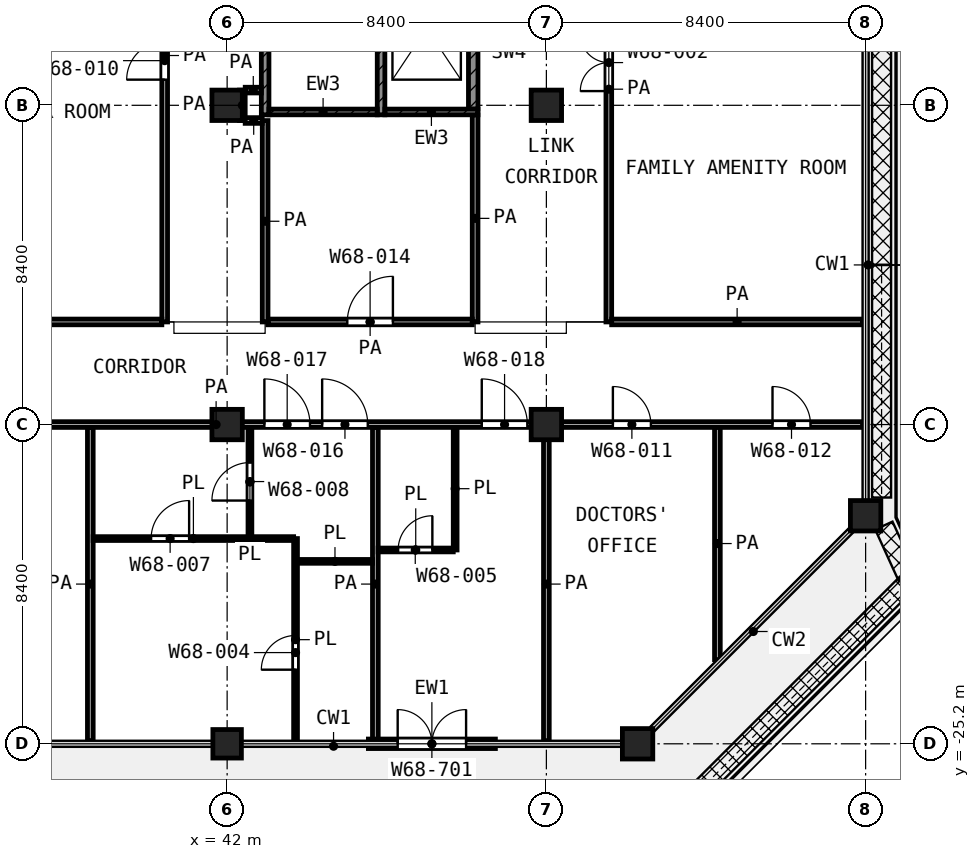
"""IFC4 building model, lengths in metres.
Left out: names, types, materials, properties, quantities, classifications, styles, units other than length and angle.
Written with IfcOpenShell. Run it as: python <this file> out.ifc"""

import sys

from ifc_helpers import new_model, si_unit, direction, frame, frame_2d, origin, origin_2d, place, context, subcontext, project, spatial, rectangle, extrude, element, fill, save


model = new_model("IFC4")
c1 = context("Model", 3, precision=1e-05, world=origin(), true_north=direction((0.0, 1.0)))
c2 = subcontext(c1, "Body", "Model", "MODEL_VIEW")
j1 = project(units=[si_unit("LENGTHUNIT", "METRE"), si_unit("PLANEANGLEUNIT", "RADIAN")], contexts=[c1])
p1 = place(None, origin())
s1 = spatial("IfcSite", under=j1, at=p1, CompositionType="ELEMENT")
p2 = place(p1, origin())
s2 = spatial("IfcBuilding", under=s1, at=p2, CompositionType="ELEMENT")
p3 = place(p2, frame((0.0, 0.0, 294.4)))
s3 = spatial("IfcBuildingStorey", under=s2, at=p3, CompositionType="ELEMENT", Elevation=294.4)
for number, where, z_axis, x_axis in (
    (1, (42.0, -8.4, 0.0), (0.0, 0.0, 1.0), (1.0, 0.0, 0.0)),
    (2, (50.4, -8.4, 0.0), (0.0, 0.0, 1.0), (1.0, 0.0, 0.0)),
    (3, (42.0, -16.8, 0.0), (0.0, 0.0, 1.0), (1.0, 0.0, 0.0)),
    (4, (50.4, -16.8, 0.0), (0.0, 0.0, 1.0), (1.0, 0.0, 0.0)),
    (5, (58.8, -19.2, 0.0), (0.0, 0.0, 1.0), (1.0, 0.0, 0.0)),
):
    element("IfcColumn", number, at=place(p3, frame(where, z_axis=z_axis, x_axis=x_axis)), inside=s3, PredefinedType="COLUMN", context=c2, shape_type="SweptSolid", body=[
        extrude(rectangle(XDim=0.8, YDim=0.8, at=origin_2d()), origin(), (0.0, 0.0, 1.0), 4.2),
    ])
p4 = place(p3, frame((42.0, -25.2, 0.0), z_axis=(0.0, 0.0, 1.0), x_axis=(1.0, 0.0, 0.0)))
e6 = element("IfcColumn", 6, at=p4, inside=s3, PredefinedType="COLUMN", context=c2, shape_type="SweptSolid", body=[
    extrude(rectangle(XDim=0.75, YDim=0.75, at=origin_2d()), origin(), (0.0, 0.0, 1.0), 4.2),
])
p5 = place(p3, frame((52.8, -25.2, 0.0), z_axis=(0.0, 0.0, 1.0), x_axis=(1.0, 0.0, 0.0)))
e7 = element("IfcColumn", 7, at=p5, inside=s3, PredefinedType="COLUMN", context=c2, shape_type="SweptSolid", body=[
    extrude(rectangle(XDim=0.8, YDim=0.8, at=origin_2d()), origin(), (0.0, 0.0, 1.0), 4.2),
])
p6 = place(p3, frame((45.717, -25.2, 0.0), z_axis=(0.0, 0.0, 1.0), x_axis=(1.0, 0.0, 0.0)))
e8 = element("IfcWall", 8, at=p6, inside=s3, PredefinedType="SOLIDWALL", context=c2, shape_type="SweptSolid", body=[
    extrude(rectangle(XDim=3.342, YDim=0.25, at=frame_2d((1.671, 0.0))), origin(), (0.0, 0.0, 1.0), 3.48),
])
p7 = place(p6, frame((0.771, 0.0, 0.0)))
e9 = element("IfcOpeningElement", 9, at=p7, cuts=e8, PredefinedType="OPENING", context=c2, shape_type="SweptSolid", body=[
    extrude(rectangle(XDim=1.8, YDim=2.1, at=frame_2d((0.9, 1.05))), frame((0.0, 0.135, 0.0), z_axis=(0.0, -1.0, 0.0), x_axis=(1.0, 0.0, 0.0)), (0.0, 0.0, 1.0), 0.27),
])
p8 = place(p3, frame((43.0, -8.65, 0.0), z_axis=(0.0, 0.0, 1.0), x_axis=(0.0, 1.0, 0.0)))
e10 = element("IfcWall", 10, at=p8, inside=s3, PredefinedType="SHEAR", context=c2, shape_type="SweptSolid", body=[
    extrude(rectangle(XDim=8.35, YDim=0.2, at=frame_2d((4.175, 0.0))), origin(), (0.0, 0.0, 1.0), 3.6),
])
p9 = place(p8, frame((7.0, 0.0, 0.0)))
e11 = element("IfcOpeningElement", 11, at=p9, cuts=e10, PredefinedType="OPENING", context=c2, shape_type="SweptSolid", body=[
    extrude(rectangle(XDim=1.1, YDim=2.1, at=frame_2d((0.55, 1.05))), frame((0.0, 0.11, 0.0), z_axis=(0.0, -1.0, 0.0), x_axis=(1.0, 0.0, 0.0)), (0.0, 0.0, 1.0), 0.22),
])
p10 = place(p3, frame((46.05, -8.65, 0.0), z_axis=(0.0, 0.0, 1.0), x_axis=(0.0, 1.0, 0.0)))
e12 = element("IfcWall", 12, at=p10, inside=s3, PredefinedType="SHEAR", context=c2, shape_type="SweptSolid", body=[
    extrude(rectangle(XDim=8.35, YDim=0.2, at=frame_2d((4.175, 0.0))), origin(), (0.0, 0.0, 1.0), 3.6),
])
p11 = place(p10, frame((7.0, 0.0, 0.0)))
e13 = element("IfcOpeningElement", 13, at=p11, cuts=e12, PredefinedType="OPENING", context=c2, shape_type="SweptSolid", body=[
    extrude(rectangle(XDim=1.1, YDim=2.1, at=frame_2d((0.55, 1.05))), frame((0.0, 0.11, 0.0), z_axis=(0.0, -1.0, 0.0), x_axis=(1.0, 0.0, 0.0)), (0.0, 0.0, 1.0), 0.22),
])
p12 = place(p3, frame((43.1, -8.575, 0.0), z_axis=(0.0, 0.0, 1.0), x_axis=(1.0, 0.0, 0.0)))
e14 = element("IfcWall", 14, at=p12, inside=s3, PredefinedType="SHEAR", context=c2, shape_type="SweptSolid", body=[
    extrude(rectangle(XDim=2.85, YDim=0.15, at=frame_2d((1.425, 0.0))), origin(), (0.0, 0.0, 1.0), 3.6),
])
p13 = place(p3, frame((46.15, -8.575, 0.0), z_axis=(0.0, 0.0, 1.0), x_axis=(1.0, 0.0, 0.0)))
e15 = element("IfcWall", 15, at=p13, inside=s3, PredefinedType="SHEAR", context=c2, shape_type="SweptSolid", body=[
    extrude(rectangle(XDim=2.45, YDim=0.15, at=frame_2d((1.225, 0.0))), origin(), (0.0, 0.0, 1.0), 3.6),
])
p14 = place(p3, frame((48.475, -8.5, 0.0), z_axis=(0.0, 0.0, 1.0), x_axis=(0.0, 1.0, 0.0)))
e16 = element("IfcWall", 16, at=p14, inside=s3, PredefinedType="SHEAR", context=c2, shape_type="SweptSolid", body=[
    extrude(rectangle(XDim=3.475, YDim=0.25, at=frame_2d((1.738, 0.0))), origin(), (0.0, 0.0, 1.0), 3.6),
])
p15 = place(p3, frame((43.85, -20.4, 0.0), z_axis=(0.0, 0.0, 1.0), x_axis=(1.0, 0.0, 0.0)))
e17 = element("IfcWall", 17, at=p15, inside=s3, PredefinedType="PARTITIONING", context=c2, shape_type="SweptSolid", body=[
    extrude(rectangle(XDim=1.975, YDim=0.1, at=frame_2d((0.987, 0.0))), origin(), (0.0, 0.0, 1.0), 3.6),
])
p16 = place(p3, frame((45.975, -20.1, 0.0), z_axis=(0.0, 0.0, 1.0), x_axis=(1.0, 0.0, 0.0)))
e18 = element("IfcWall", 18, at=p16, inside=s3, PredefinedType="PARTITIONING", context=c2, shape_type="SweptSolid", body=[
    extrude(rectangle(XDim=1.975, YDim=0.1, at=frame_2d((0.987, 0.0))), origin(), (0.0, 0.0, 1.0), 3.6),
])
p17 = place(p16, frame((0.525, 0.0, 0.0)))
e19 = element("IfcOpeningElement", 19, at=p17, cuts=e18, PredefinedType="OPENING", context=c2, shape_type="SweptSolid", body=[
    extrude(rectangle(XDim=0.9, YDim=2.1, at=frame_2d((0.45, 1.05))), frame((0.0, 0.06, 0.0), z_axis=(0.0, -1.0, 0.0), x_axis=(1.0, 0.0, 0.0)), (0.0, 0.0, 1.0), 0.12),
])
p18 = place(p3, frame((38.475, -19.8, 0.0), z_axis=(0.0, 0.0, 1.0), x_axis=(1.0, 0.0, 0.0)))
e20 = element("IfcWall", 20, at=p18, inside=s3, PredefinedType="PARTITIONING", context=c2, shape_type="SweptSolid", body=[
    extrude(rectangle(XDim=5.275, YDim=0.1, at=frame_2d((2.637, 0.0))), origin(), (0.0, 0.0, 1.0), 3.6),
])
p19 = place(p18, frame((1.525, 0.0, 0.0)))
e21 = element("IfcOpeningElement", 21, at=p19, cuts=e20, PredefinedType="OPENING", context=c2, shape_type="SweptSolid", body=[
    extrude(rectangle(XDim=1.0, YDim=2.1, at=frame_2d((0.5, 1.05))), frame((0.0, 0.06, 0.0), z_axis=(0.0, -1.0, 0.0), x_axis=(1.0, 0.0, 0.0)), (0.0, 0.0, 1.0), 0.12),
])
p20 = place(p3, frame((42.6, -19.75, 0.0), z_axis=(0.0, 0.0, 1.0), x_axis=(0.0, 1.0, 0.0)))
e22 = element("IfcWall", 22, at=p20, inside=s3, PredefinedType="PARTITIONING", context=c2, shape_type="SweptSolid", body=[
    extrude(rectangle(XDim=2.875, YDim=0.1, at=frame_2d((1.438, 0.0))), origin(), (0.0, 0.0, 1.0), 3.6),
])
p21 = place(p20, frame((0.95, 0.0, 0.0)))
e23 = element("IfcOpeningElement", 23, at=p21, cuts=e22, PredefinedType="OPENING", context=c2, shape_type="SweptSolid", body=[
    extrude(rectangle(XDim=1.0, YDim=2.1, at=frame_2d((0.5, 1.05))), frame((0.0, 0.06, 0.0), z_axis=(0.0, -1.0, 0.0), x_axis=(1.0, 0.0, 0.0)), (0.0, 0.0, 1.0), 0.12),
])
p22 = place(p3, frame((43.8, -25.12, 0.0), z_axis=(0.0, 0.0, 1.0), x_axis=(0.0, 1.0, 0.0)))
e24 = element("IfcWall", 24, at=p22, inside=s3, PredefinedType="PARTITIONING", context=c2, shape_type="SweptSolid", body=[
    extrude(rectangle(XDim=5.32, YDim=0.1, at=frame_2d((2.66, 0.0))), origin(), (0.0, 0.0, 1.0), 3.6),
])
p23 = place(p22, frame((1.87, 0.0, 0.0)))
e25 = element("IfcOpeningElement", 25, at=p23, cuts=e24, PredefinedType="OPENING", context=c2, shape_type="SweptSolid", body=[
    extrude(rectangle(XDim=0.9, YDim=2.1, at=frame_2d((0.45, 1.05))), frame((0.0, 0.06, 0.0), z_axis=(0.0, -1.0, 0.0), x_axis=(1.0, 0.0, 0.0)), (0.0, 0.0, 1.0), 0.12),
])
p24 = place(p3, frame((48.0, -20.1, 0.0), z_axis=(0.0, 0.0, 1.0), x_axis=(0.0, 1.0, 0.0)))
e26 = element("IfcWall", 26, at=p24, inside=s3, PredefinedType="PARTITIONING", context=c2, shape_type="SweptSolid", body=[
    extrude(rectangle(XDim=3.225, YDim=0.1, at=frame_2d((1.613, 0.0))), origin(), (0.0, 0.0, 1.0), 3.6),
])
p25 = place(p3, frame((24.7, -16.8, 0.0), z_axis=(0.0, 0.0, 1.0), x_axis=(1.0, 0.0, 0.0)))
e27 = element("IfcWall", 27, at=p25, inside=s3, PredefinedType="PARTITIONING", context=c2, shape_type="SweptSolid", body=[
    extrude(rectangle(XDim=34.02, YDim=0.15, at=frame_2d((17.01, 0.0))), origin(), (0.0, 0.0, 1.0), 3.6),
])
p26 = place(p25, frame((1.85, 0.0, 0.0)))
e28 = element("IfcOpeningElement", 28, at=p26, cuts=e27, PredefinedType="OPENING", context=c2, shape_type="SweptSolid", body=[
    extrude(rectangle(XDim=1.5, YDim=2.1, at=frame_2d((0.75, 1.05))), frame((0.0, 0.085, 0.0), z_axis=(0.0, -1.0, 0.0), x_axis=(1.0, 0.0, 0.0)), (0.0, 0.0, 1.0), 0.17),
])
p27 = place(p25, frame((9.4, 0.0, 0.0)))
e29 = element("IfcOpeningElement", 29, at=p27, cuts=e27, PredefinedType="OPENING", context=c2, shape_type="SweptSolid", body=[
    extrude(rectangle(XDim=1.2, YDim=2.1, at=frame_2d((0.6, 1.05))), frame((0.0, 0.085, 0.0), z_axis=(0.0, -1.0, 0.0), x_axis=(1.0, 0.0, 0.0)), (0.0, 0.0, 1.0), 0.17),
])
p28 = place(p25, frame((19.8, 0.0, 0.0)))
e30 = element("IfcOpeningElement", 30, at=p28, cuts=e27, PredefinedType="OPENING", context=c2, shape_type="SweptSolid", body=[
    extrude(rectangle(XDim=1.2, YDim=2.1, at=frame_2d((0.6, 1.05))), frame((0.0, 0.085, 0.0), z_axis=(0.0, -1.0, 0.0), x_axis=(1.0, 0.0, 0.0)), (0.0, 0.0, 1.0), 0.17),
])
p29 = place(p25, frame((18.28, 0.0, 0.0)))
e31 = element("IfcOpeningElement", 31, at=p29, cuts=e27, PredefinedType="OPENING", context=c2, shape_type="SweptSolid", body=[
    extrude(rectangle(XDim=1.2, YDim=2.1, at=frame_2d((0.6, 1.05))), frame((0.0, 0.085, 0.0), z_axis=(0.0, -1.0, 0.0), x_axis=(1.0, 0.0, 0.0)), (0.0, 0.0, 1.0), 0.17),
])
p30 = place(p25, frame((24.0, 0.0, 0.0)))
e32 = element("IfcOpeningElement", 32, at=p30, cuts=e27, PredefinedType="OPENING", context=c2, shape_type="SweptSolid", body=[
    extrude(rectangle(XDim=1.2, YDim=2.1, at=frame_2d((0.6, 1.05))), frame((0.0, 0.085, 0.0), z_axis=(0.0, -1.0, 0.0), x_axis=(1.0, 0.0, 0.0)), (0.0, 0.0, 1.0), 0.17),
])
p31 = place(p25, frame((27.45, 0.0, 0.0)))
e33 = element("IfcOpeningElement", 33, at=p31, cuts=e27, PredefinedType="OPENING", context=c2, shape_type="SweptSolid", body=[
    extrude(rectangle(XDim=1.0, YDim=2.1, at=frame_2d((0.5, 1.05))), frame((0.0, 0.085, 0.0), z_axis=(0.0, -1.0, 0.0), x_axis=(1.0, 0.0, 0.0)), (0.0, 0.0, 1.0), 0.17),
])
p32 = place(p25, frame((31.65, 0.0, 0.0)))
e34 = element("IfcOpeningElement", 34, at=p32, cuts=e27, PredefinedType="OPENING", context=c2, shape_type="SweptSolid", body=[
    extrude(rectangle(XDim=1.0, YDim=2.1, at=frame_2d((0.5, 1.05))), frame((0.0, 0.085, 0.0), z_axis=(0.0, -1.0, 0.0), x_axis=(1.0, 0.0, 0.0)), (0.0, 0.0, 1.0), 0.17),
])
p33 = place(p3, frame((29.475, -14.1, 0.0), z_axis=(0.0, 0.0, 1.0), x_axis=(1.0, 0.0, 0.0)))
e35 = element("IfcWall", 35, at=p33, inside=s3, PredefinedType="PARTITIONING", context=c2, shape_type="SweptSolid", body=[
    extrude(rectangle(XDim=10.807, YDim=0.15, at=frame_2d((5.403, 0.0))), origin(), (0.0, 0.0, 1.0), 3.6),
])
p34 = place(p33, frame((1.425, 0.0, 0.0)))
e36 = element("IfcOpeningElement", 36, at=p34, cuts=e35, PredefinedType="OPENING", context=c2, shape_type="SweptSolid", body=[
    extrude(rectangle(XDim=1.2, YDim=2.1, at=frame_2d((0.6, 1.05))), frame((0.0, 0.085, 0.0), z_axis=(0.0, -1.0, 0.0), x_axis=(1.0, 0.0, 0.0)), (0.0, 0.0, 1.0), 0.17),
])
p35 = place(p3, frame((43.075, -14.1, 0.0), z_axis=(0.0, 0.0, 1.0), x_axis=(1.0, 0.0, 0.0)))
e37 = element("IfcWall", 37, at=p35, inside=s3, PredefinedType="PARTITIONING", context=c2, shape_type="SweptSolid", body=[
    extrude(rectangle(XDim=5.375, YDim=0.15, at=frame_2d((2.688, 0.0))), origin(), (0.0, 0.0, 1.0), 3.6),
])
p36 = place(p35, frame((2.087, 0.0, 0.0)))
e38 = element("IfcOpeningElement", 38, at=p36, cuts=e37, PredefinedType="OPENING", context=c2, shape_type="SweptSolid", body=[
    extrude(rectangle(XDim=1.2, YDim=2.1, at=frame_2d((0.6, 1.05))), frame((0.0, 0.085, 0.0), z_axis=(0.0, -1.0, 0.0), x_axis=(1.0, 0.0, 0.0)), (0.0, 0.0, 1.0), 0.17),
])
p37 = place(p3, frame((52.118, -14.1, 0.0), z_axis=(0.0, 0.0, 1.0), x_axis=(1.0, 0.0, 0.0)))
e39 = element("IfcWall", 39, at=p37, inside=s3, PredefinedType="PARTITIONING", context=c2, shape_type="SweptSolid", body=[
    extrude(rectangle(XDim=6.602, YDim=0.15, at=frame_2d((3.301, 0.0))), origin(), (0.0, 0.0, 1.0), 3.6),
])
p38 = place(p3, frame((42.475, -8.8, 0.0), z_axis=(0.0, 0.0, 1.0), x_axis=(1.0, 0.0, 0.0)))
e40 = element("IfcWall", 40, at=p38, inside=s3, PredefinedType="PARTITIONING", context=c2, shape_type="SweptSolid", body=[
    extrude(rectangle(XDim=0.448, YDim=0.15, at=frame_2d((0.224, 0.0))), origin(), (0.0, 0.0, 1.0), 3.6),
])
p39 = place(p3, frame((42.476, -8.0, 0.0), z_axis=(0.0, 0.0, 1.0), x_axis=(1.0, 0.0, 0.0)))
e41 = element("IfcWall", 41, at=p39, inside=s3, PredefinedType="PARTITIONING", context=c2, shape_type="SweptSolid", body=[
    extrude(rectangle(XDim=0.424, YDim=0.15, at=frame_2d((0.212, 0.0))), origin(), (0.0, 0.0, 1.0), 3.6),
])
p40 = place(p3, frame((38.4, -25.12, 0.0), z_axis=(0.0, 0.0, 1.0), x_axis=(0.0, 1.0, 0.0)))
e42 = element("IfcWall", 42, at=p40, inside=s3, PredefinedType="PARTITIONING", context=c2, shape_type="SweptSolid", body=[
    extrude(rectangle(XDim=8.245, YDim=0.15, at=frame_2d((4.123, 0.0))), origin(), (0.0, 0.0, 1.0), 3.6),
])
p41 = place(p3, frame((40.357, -14.1, 0.0), z_axis=(0.0, 0.0, 1.0), x_axis=(0.0, 1.0, 0.0)))
e43 = element("IfcWall", 43, at=p41, inside=s3, PredefinedType="PARTITIONING", context=c2, shape_type="SweptSolid", body=[
    extrude(rectangle(XDim=14.02, YDim=0.15, at=frame_2d((7.01, 0.0))), origin(), (0.0, 0.0, 1.0), 3.6),
])
p42 = place(p41, frame((6.375, 0.0, 0.0)))
e44 = element("IfcOpeningElement", 44, at=p42, cuts=e43, PredefinedType="OPENING", context=c2, shape_type="SweptSolid", body=[
    extrude(rectangle(XDim=1.0, YDim=2.1, at=frame_2d((0.5, 1.05))), frame((0.0, 0.085, 0.0), z_axis=(0.0, -1.0, 0.0), x_axis=(1.0, 0.0, 0.0)), (0.0, 0.0, 1.0), 0.17),
])
p43 = place(p3, frame((42.4, -8.8, 0.0), z_axis=(0.0, 0.0, 1.0), x_axis=(0.0, 1.0, 0.0)))
e45 = element("IfcWall", 45, at=p43, inside=s3, PredefinedType="PARTITIONING", context=c2, shape_type="SweptSolid", body=[
    extrude(rectangle(XDim=0.799, YDim=0.15, at=frame_2d((0.399, 0.0))), origin(), (0.0, 0.0, 1.0), 3.6),
])
p44 = place(p3, frame((43.0, -14.1, 0.0), z_axis=(0.0, 0.0, 1.0), x_axis=(0.0, 1.0, 0.0)))
e46 = element("IfcWall", 46, at=p44, inside=s3, PredefinedType="PARTITIONING", context=c2, shape_type="SweptSolid", body=[
    extrude(rectangle(XDim=5.298, YDim=0.15, at=frame_2d((2.649, 0.0))), origin(), (0.0, 0.0, 1.0), 3.6),
])
p45 = place(p3, frame((45.9, -25.12, 0.0), z_axis=(0.0, 0.0, 1.0), x_axis=(0.0, 1.0, 0.0)))
e47 = element("IfcWall", 47, at=p45, inside=s3, PredefinedType="PARTITIONING", context=c2, shape_type="SweptSolid", body=[
    extrude(rectangle(XDim=8.245, YDim=0.15, at=frame_2d((4.123, 0.0))), origin(), (0.0, 0.0, 1.0), 3.6),
])
p46 = place(p3, frame((48.525, -14.1, 0.0), z_axis=(0.0, 0.0, 1.0), x_axis=(0.0, 1.0, 0.0)))
e48 = element("IfcWall", 48, at=p46, inside=s3, PredefinedType="PARTITIONING", context=c2, shape_type="SweptSolid", body=[
    extrude(rectangle(XDim=5.45, YDim=0.15, at=frame_2d((2.725, 0.0))), origin(), (0.0, 0.0, 1.0), 3.6),
])
p47 = place(p3, frame((50.4, -25.12, 0.0), z_axis=(0.0, 0.0, 1.0), x_axis=(0.0, 1.0, 0.0)))
e49 = element("IfcWall", 49, at=p47, inside=s3, PredefinedType="PARTITIONING", context=c2, shape_type="SweptSolid", body=[
    extrude(rectangle(XDim=8.245, YDim=0.15, at=frame_2d((4.123, 0.0))), origin(), (0.0, 0.0, 1.0), 3.6),
])
p48 = place(p3, frame((52.043, -14.1, 0.0), z_axis=(0.0, 0.0, 1.0), x_axis=(0.0, 1.0, 0.0)))
e50 = element("IfcWall", 50, at=p48, inside=s3, PredefinedType="PARTITIONING", context=c2, shape_type="SweptSolid", body=[
    extrude(rectangle(XDim=12.248, YDim=0.15, at=frame_2d((6.124, 0.0))), origin(), (0.0, 0.0, 1.0), 3.6),
])
p49 = place(p48, frame((6.074, 0.0, 0.0)))
e51 = element("IfcOpeningElement", 51, at=p49, cuts=e50, PredefinedType="OPENING", context=c2, shape_type="SweptSolid", body=[
    extrude(rectangle(XDim=1.5, YDim=2.1, at=frame_2d((0.75, 1.05))), frame((0.0, 0.085, 0.0), z_axis=(0.0, -1.0, 0.0), x_axis=(1.0, 0.0, 0.0)), (0.0, 0.0, 1.0), 0.17),
])
p50 = place(p3, frame((54.9, -22.987, 0.0), z_axis=(0.0, 0.0, 1.0), x_axis=(0.0, 1.0, 0.0)))
e52 = element("IfcWall", 52, at=p50, inside=s3, PredefinedType="PARTITIONING", context=c2, shape_type="SweptSolid", body=[
    extrude(rectangle(XDim=6.112, YDim=0.15, at=frame_2d((3.056, 0.0))), origin(), (0.0, 0.0, 1.0), 3.6),
])
p51 = place(p7, origin())
e53 = element("IfcDoor", 53, at=p51, inside=s3, OperationType="DOUBLE_DOOR_SINGLE_SWING", PredefinedType="DOOR", context=c2, shape_type="SweptSolid", body=[
    extrude(rectangle(XDim=1.8, YDim=2.1, at=frame_2d((0.9, 1.05))), frame((0.0, 0.025, 0.0), z_axis=(0.0, -1.0, 0.0), x_axis=(1.0, 0.0, 0.0)), (0.0, 0.0, 1.0), 0.05),
])
fill(e9, e53)
p52 = place(p42, origin())
e54 = element("IfcDoor", 54, at=p52, inside=s3, OperationType="SINGLE_SWING_LEFT", PredefinedType="DOOR", context=c2, shape_type="SweptSolid", body=[
    extrude(rectangle(XDim=1.0, YDim=2.1, at=frame_2d((0.5, 1.05))), frame((0.0, 0.025, 0.0), z_axis=(0.0, -1.0, 0.0), x_axis=(1.0, 0.0, 0.0)), (0.0, 0.0, 1.0), 0.05),
])
fill(e44, e54)
p53 = place(p36, origin())
e55 = element("IfcDoor", 55, at=p53, inside=s3, OperationType="SINGLE_SWING_RIGHT", PredefinedType="DOOR", context=c2, shape_type="SweptSolid", body=[
    extrude(rectangle(XDim=1.2, YDim=2.1, at=frame_2d((0.6, 1.05))), frame((0.0, 0.025, 0.0), z_axis=(0.0, -1.0, 0.0), x_axis=(1.0, 0.0, 0.0)), (0.0, 0.0, 1.0), 0.05),
])
fill(e38, e55)
p54 = place(p49, origin())
e56 = element("IfcDoor", 56, at=p54, inside=s3, OperationType="DOUBLE_DOOR_SINGLE_SWING", PredefinedType="DOOR", context=c2, shape_type="SweptSolid", body=[
    extrude(rectangle(XDim=1.5, YDim=2.1, at=frame_2d((0.75, 1.05))), frame((0.0, 0.025, 0.0), z_axis=(0.0, -1.0, 0.0), x_axis=(1.0, 0.0, 0.0)), (0.0, 0.0, 1.0), 0.05),
])
fill(e51, e56)
p55 = place(p28, origin())
e57 = element("IfcDoor", 57, at=p55, inside=s3, OperationType="SINGLE_SWING_LEFT", PredefinedType="DOOR", context=c2, shape_type="SweptSolid", body=[
    extrude(rectangle(XDim=1.2, YDim=2.1, at=frame_2d((0.6, 1.05))), frame((0.0, 0.025, 0.0), z_axis=(0.0, -1.0, 0.0), x_axis=(1.0, 0.0, 0.0)), (0.0, 0.0, 1.0), 0.05),
])
fill(e30, e57)
p56 = place(p29, origin())
e58 = element("IfcDoor", 58, at=p56, inside=s3, OperationType="SINGLE_SWING_LEFT", PredefinedType="DOOR", context=c2, shape_type="SweptSolid", body=[
    extrude(rectangle(XDim=1.2, YDim=2.1, at=frame_2d((0.6, 1.05))), frame((0.0, 0.025, 0.0), z_axis=(0.0, -1.0, 0.0), x_axis=(1.0, 0.0, 0.0)), (0.0, 0.0, 1.0), 0.05),
])
fill(e31, e58)
p57 = place(p19, origin())
e59 = element("IfcDoor", 59, at=p57, inside=s3, OperationType="SINGLE_SWING_RIGHT", PredefinedType="DOOR", context=c2, shape_type="SweptSolid", body=[
    extrude(rectangle(XDim=1.0, YDim=2.1, at=frame_2d((0.5, 1.05))), frame((0.0, 0.025, 0.0), z_axis=(0.0, -1.0, 0.0), x_axis=(1.0, 0.0, 0.0)), (0.0, 0.0, 1.0), 0.05),
])
fill(e21, e59)
p58 = place(p21, origin())
e60 = element("IfcDoor", 60, at=p58, inside=s3, OperationType="SINGLE_SWING_LEFT", PredefinedType="DOOR", context=c2, shape_type="SweptSolid", body=[
    extrude(rectangle(XDim=1.0, YDim=2.1, at=frame_2d((0.5, 1.05))), frame((0.0, 0.025, 0.0), z_axis=(0.0, -1.0, 0.0), x_axis=(1.0, 0.0, 0.0)), (0.0, 0.0, 1.0), 0.05),
])
fill(e23, e60)
p59 = place(p23, origin())
e61 = element("IfcDoor", 61, at=p59, inside=s3, OperationType="SINGLE_SWING_LEFT", PredefinedType="DOOR", context=c2, shape_type="SweptSolid", body=[
    extrude(rectangle(XDim=0.9, YDim=2.1, at=frame_2d((0.45, 1.05))), frame((0.0, 0.025, 0.0), z_axis=(0.0, -1.0, 0.0), x_axis=(1.0, 0.0, 0.0)), (0.0, 0.0, 1.0), 0.05),
])
fill(e25, e61)
p60 = place(p30, origin())
e62 = element("IfcDoor", 62, at=p60, inside=s3, OperationType="SINGLE_SWING_LEFT", PredefinedType="DOOR", context=c2, shape_type="SweptSolid", body=[
    extrude(rectangle(XDim=1.2, YDim=2.1, at=frame_2d((0.6, 1.05))), frame((0.0, 0.025, 0.0), z_axis=(0.0, -1.0, 0.0), x_axis=(1.0, 0.0, 0.0)), (0.0, 0.0, 1.0), 0.05),
])
fill(e32, e62)
p61 = place(p17, origin())
e63 = element("IfcDoor", 63, at=p61, inside=s3, OperationType="SINGLE_SWING_RIGHT", PredefinedType="DOOR", context=c2, shape_type="SweptSolid", body=[
    extrude(rectangle(XDim=0.9, YDim=2.1, at=frame_2d((0.45, 1.05))), frame((0.0, 0.025, 0.0), z_axis=(0.0, -1.0, 0.0), x_axis=(1.0, 0.0, 0.0)), (0.0, 0.0, 1.0), 0.05),
])
fill(e19, e63)
p62 = place(p31, origin())
e64 = element("IfcDoor", 64, at=p62, inside=s3, OperationType="SINGLE_SWING_LEFT", PredefinedType="DOOR", context=c2, shape_type="SweptSolid", body=[
    extrude(rectangle(XDim=1.0, YDim=2.1, at=frame_2d((0.5, 1.05))), frame((0.0, 0.025, 0.0), z_axis=(0.0, -1.0, 0.0), x_axis=(1.0, 0.0, 0.0)), (0.0, 0.0, 1.0), 0.05),
])
fill(e33, e64)
p63 = place(p32, origin())
e65 = element("IfcDoor", 65, at=p63, inside=s3, OperationType="SINGLE_SWING_LEFT", PredefinedType="DOOR", context=c2, shape_type="SweptSolid", body=[
    extrude(rectangle(XDim=1.0, YDim=2.1, at=frame_2d((0.5, 1.05))), frame((0.0, 0.025, 0.0), z_axis=(0.0, -1.0, 0.0), x_axis=(1.0, 0.0, 0.0)), (0.0, 0.0, 1.0), 0.05),
])
fill(e34, e65)
save(model, sys.argv[1])
